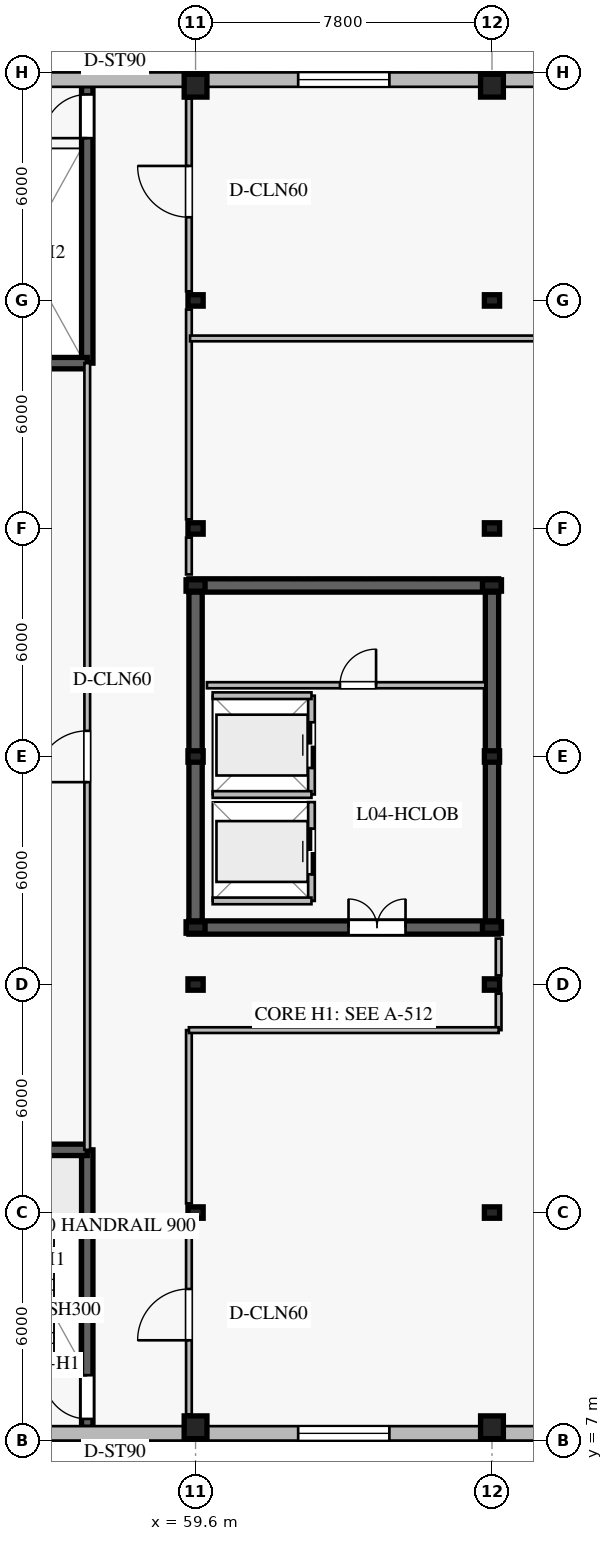
"""IFC4 building model, lengths in metres.
Left out: names, types, materials, properties, quantities, classifications, styles, units other than length and angle.
Written with IfcOpenShell. Run it as: python <this file> out.ifc"""

import sys

from ifc_helpers import new_model, si_unit, direction, frame, frame_2d, origin, origin_2d, place, context, subcontext, project, spatial, rectangle, i_section, extrude, element, fill, save


model = new_model("IFC4")
c1 = context("Model", 3, precision=1e-05, world=origin(), true_north=direction((0.0, 1.0)))
c2 = subcontext(c1, "Body", "Model", "MODEL_VIEW")
j1 = project(units=[si_unit("LENGTHUNIT", "METRE"), si_unit("PLANEANGLEUNIT", "RADIAN")], contexts=[c1])
p1 = place(None, origin())
s1 = spatial("IfcSite", under=j1, at=p1, CompositionType="ELEMENT")
p2 = place(p1, origin())
s2 = spatial("IfcBuilding", under=s1, at=p2, CompositionType="ELEMENT")
p3 = place(p2, frame((0.0, 0.0, 19.0)))
s3 = spatial("IfcBuildingStorey", under=s2, at=p3, CompositionType="ELEMENT", Elevation=19.0)
p4 = place(p3, frame((59.425, 20.5, 0.0), z_axis=(0.0, 0.0, 1.0), x_axis=(1.0, 0.0, 0.0)))
e1 = element("IfcWall", 1, at=p4, inside=s3, PredefinedType="SHEAR", context=c2, shape_type="SweptSolid", body=[
    extrude(rectangle(XDim=8.15, YDim=0.35, at=frame_2d((4.075, 0.0))), origin(), (0.0, 0.0, 1.0), 4.73),
])
p5 = place(p4, frame((4.2, 0.0, 0.0)))
e2 = element("IfcOpeningElement", 2, at=p5, cuts=e1, PredefinedType="OPENING", context=c2, shape_type="SweptSolid", body=[
    extrude(rectangle(XDim=1.5, YDim=2.2, at=frame_2d((0.75, 1.1))), frame((0.0, 0.185, 0.0), z_axis=(0.0, -1.0, 0.0), x_axis=(1.0, 0.0, 0.0)), (0.0, 0.0, 1.0), 0.37),
])
p6 = place(p3, frame((67.575, 29.5, 0.0), z_axis=(0.0, 0.0, 1.0), x_axis=(-1.0, 0.0, 0.0)))
e3 = element("IfcWall", 3, at=p6, inside=s3, PredefinedType="SHEAR", context=c2, shape_type="SweptSolid", body=[
    extrude(rectangle(XDim=8.15, YDim=0.35, at=frame_2d((4.075, 0.0))), origin(), (0.0, 0.0, 1.0), 4.73),
])
for number, where, z_axis, x_axis in (
    (4, (59.6, 29.325, 0.0), (0.0, 0.0, 1.0), (0.0, -1.0, 0.0)),
    (5, (67.4, 20.675, 0.0), (0.0, 0.0, 1.0), (0.0, 1.0, 0.0)),
):
    element("IfcWall", number, at=place(p3, frame(where, z_axis=z_axis, x_axis=x_axis)), inside=s3, PredefinedType="SHEAR", context=c2, shape_type="SweptSolid", body=[
        extrude(rectangle(XDim=8.65, YDim=0.35, at=frame_2d((4.325, 0.0))), origin(), (0.0, 0.0, 1.0), 4.73),
    ])
for number, where, z_axis, x_axis in (
    (6, (59.6, 20.5, 0.0), (0.0, 0.0, 1.0), (1.0, 0.0, 0.0)),
    (7, (67.4, 20.5, 0.0), (0.0, 0.0, 1.0), (1.0, 0.0, 0.0)),
    (8, (67.4, 29.5, 0.0), (0.0, 0.0, 1.0), (1.0, 0.0, 0.0)),
    (9, (59.6, 29.5, 0.0), (0.0, 0.0, 1.0), (1.0, 0.0, 0.0)),
):
    element("IfcColumn", number, at=place(p3, frame(where, z_axis=z_axis, x_axis=x_axis)), inside=s3, PredefinedType="COLUMN", context=c2, shape_type="SweptSolid", body=[
        extrude(i_section(OverallWidth=0.3, OverallDepth=0.5, WebThickness=0.014, FlangeThickness=0.028, at=origin_2d()), origin(), (0.0, 0.0, 1.0), 5.0),
    ])
p7 = place(p3, frame((56.75, 7.35, 0.0), z_axis=(0.0, 0.0, 1.0), x_axis=(0.0, 1.0, 0.0)))
e10 = element("IfcWall", 10, at=p7, inside=s3, PredefinedType="SOLIDWALL", context=c2, shape_type="SweptSolid", body=[
    extrude(rectangle(XDim=7.3, YDim=0.3, at=frame_2d((3.65, 0.0))), origin(), (0.0, 0.0, 1.0), 4.73),
])
p8 = place(p7, frame((0.22, 0.0, 0.0)))
e11 = element("IfcOpeningElement", 11, at=p8, cuts=e10, PredefinedType="OPENING", context=c2, shape_type="SweptSolid", body=[
    extrude(rectangle(XDim=1.15, YDim=2.2, at=frame_2d((0.575, 1.1))), frame((0.0, 0.16, 0.0), z_axis=(0.0, -1.0, 0.0), x_axis=(1.0, 0.0, 0.0)), (0.0, 0.0, 1.0), 0.32),
])
p9 = place(p3, frame((53.4, 14.65, 0.0), z_axis=(0.0, 0.0, 1.0), x_axis=(1.0, 0.0, 0.0)))
e12 = element("IfcWall", 12, at=p9, inside=s3, PredefinedType="SOLIDWALL", context=c2, shape_type="SweptSolid", body=[
    extrude(rectangle(XDim=3.35, YDim=0.3, at=frame_2d((1.675, 0.0))), origin(), (0.0, 0.0, 1.0), 4.73),
])
p10 = place(p3, frame((56.75, 35.35, 0.0), z_axis=(0.0, 0.0, 1.0), x_axis=(0.0, 1.0, 0.0)))
e13 = element("IfcWall", 13, at=p10, inside=s3, PredefinedType="SOLIDWALL", context=c2, shape_type="SweptSolid", body=[
    extrude(rectangle(XDim=7.3, YDim=0.3, at=frame_2d((3.65, 0.0))), origin(), (0.0, 0.0, 1.0), 4.73),
])
p11 = place(p10, frame((5.92, 0.0, 0.0)))
e14 = element("IfcOpeningElement", 14, at=p11, cuts=e13, PredefinedType="OPENING", context=c2, shape_type="SweptSolid", body=[
    extrude(rectangle(XDim=1.15, YDim=2.2, at=frame_2d((0.575, 1.1))), frame((0.0, 0.16, 0.0), z_axis=(0.0, -1.0, 0.0), x_axis=(1.0, 0.0, 0.0)), (0.0, 0.0, 1.0), 0.32),
])
p12 = place(p3, frame((53.4, 35.35, 0.0), z_axis=(0.0, 0.0, 1.0), x_axis=(1.0, 0.0, 0.0)))
e15 = element("IfcWall", 15, at=p12, inside=s3, PredefinedType="SOLIDWALL", context=c2, shape_type="SweptSolid", body=[
    extrude(rectangle(XDim=3.35, YDim=0.3, at=frame_2d((1.675, 0.0))), origin(), (0.0, 0.0, 1.0), 4.73),
])
p13 = place(p3, frame((59.6, 7.35, 0.0), z_axis=(0.0, 0.0, 1.0), x_axis=(1.0, 0.0, 0.0)))
e16 = element("IfcColumn", 16, at=p13, inside=s3, PredefinedType="COLUMN", context=c2, shape_type="SweptSolid", body=[
    extrude(rectangle(XDim=0.6, YDim=0.6, at=origin_2d()), origin(), (0.0, 0.0, 1.0), 4.73),
])
for number, where, z_axis, x_axis in (
    (17, (59.6, 13.0, 0.0), (0.0, 0.0, 1.0), (1.0, 0.0, 0.0)),
    (18, (59.6, 19.0, 0.0), (0.0, 0.0, 1.0), (1.0, 0.0, 0.0)),
):
    element("IfcColumn", number, at=place(p3, frame(where, z_axis=z_axis, x_axis=x_axis)), inside=s3, PredefinedType="COLUMN", context=c2, shape_type="SweptSolid", body=[
        extrude(i_section(OverallWidth=0.3, OverallDepth=0.4, WebThickness=0.013, FlangeThickness=0.024, at=origin_2d()), origin(), (0.0, 0.0, 1.0), 4.73),
    ])
for number, where, z_axis, x_axis in (
    (19, (59.6, 25.0, 0.0), (0.0, 0.0, 1.0), (1.0, 0.0, 0.0)),
    (20, (59.6, 31.0, 0.0), (0.0, 0.0, 1.0), (1.0, 0.0, 0.0)),
    (21, (59.6, 37.0, 0.0), (0.0, 0.0, 1.0), (1.0, 0.0, 0.0)),
):
    element("IfcColumn", number, at=place(p3, frame(where, z_axis=z_axis, x_axis=x_axis)), inside=s3, PredefinedType="COLUMN", context=c2, shape_type="SweptSolid", body=[
        extrude(i_section(OverallWidth=0.3, OverallDepth=0.4, WebThickness=0.013, FlangeThickness=0.024, at=origin_2d()), origin(), (0.0, 0.0, 1.0), 4.77),
    ])
p14 = place(p3, frame((59.6, 42.65, 0.0), z_axis=(0.0, 0.0, 1.0), x_axis=(1.0, 0.0, 0.0)))
e22 = element("IfcColumn", 22, at=p14, inside=s3, PredefinedType="COLUMN", context=c2, shape_type="SweptSolid", body=[
    extrude(rectangle(XDim=0.6, YDim=0.6, at=origin_2d()), origin(), (0.0, 0.0, 1.0), 4.77),
])
p15 = place(p3, frame((67.4, 7.35, 0.0), z_axis=(0.0, 0.0, 1.0), x_axis=(1.0, 0.0, 0.0)))
e23 = element("IfcColumn", 23, at=p15, inside=s3, PredefinedType="COLUMN", context=c2, shape_type="SweptSolid", body=[
    extrude(rectangle(XDim=0.6, YDim=0.6, at=origin_2d()), origin(), (0.0, 0.0, 1.0), 4.73),
])
for number, where, z_axis, x_axis in (
    (24, (67.4, 13.0, 0.0), (0.0, 0.0, 1.0), (1.0, 0.0, 0.0)),
    (25, (67.4, 19.0, 0.0), (0.0, 0.0, 1.0), (1.0, 0.0, 0.0)),
):
    element("IfcColumn", number, at=place(p3, frame(where, z_axis=z_axis, x_axis=x_axis)), inside=s3, PredefinedType="COLUMN", context=c2, shape_type="SweptSolid", body=[
        extrude(i_section(OverallWidth=0.3, OverallDepth=0.4, WebThickness=0.013, FlangeThickness=0.024, at=origin_2d()), origin(), (0.0, 0.0, 1.0), 4.73),
    ])
for number, where, z_axis, x_axis in (
    (26, (67.4, 25.0, 0.0), (0.0, 0.0, 1.0), (1.0, 0.0, 0.0)),
    (27, (67.4, 31.0, 0.0), (0.0, 0.0, 1.0), (1.0, 0.0, 0.0)),
    (28, (67.4, 37.0, 0.0), (0.0, 0.0, 1.0), (1.0, 0.0, 0.0)),
):
    element("IfcColumn", number, at=place(p3, frame(where, z_axis=z_axis, x_axis=x_axis)), inside=s3, PredefinedType="COLUMN", context=c2, shape_type="SweptSolid", body=[
        extrude(i_section(OverallWidth=0.3, OverallDepth=0.4, WebThickness=0.013, FlangeThickness=0.024, at=origin_2d()), origin(), (0.0, 0.0, 1.0), 4.77),
    ])
p16 = place(p3, frame((67.4, 42.65, 0.0), z_axis=(0.0, 0.0, 1.0), x_axis=(1.0, 0.0, 0.0)))
e29 = element("IfcColumn", 29, at=p16, inside=s3, PredefinedType="COLUMN", context=c2, shape_type="SweptSolid", body=[
    extrude(rectangle(XDim=0.6, YDim=0.6, at=origin_2d()), origin(), (0.0, 0.0, 1.0), 4.77),
])
p17 = place(p3, frame((75.0, 7.19, 0.0), z_axis=(0.0, 0.0, 1.0), x_axis=(-1.0, 0.0, 0.0)))
e30 = element("IfcWall", 30, at=p17, inside=s3, PredefinedType="STANDARD", context=c2, shape_type="SweptSolid", body=[
    extrude(rectangle(XDim=23.0, YDim=0.38, at=frame_2d((11.5, 0.0))), origin(), (0.0, 0.0, 1.0), 4.73),
])
p18 = place(p17, frame((10.3, 0.0, 0.95)))
e31 = element("IfcOpeningElement", 31, at=p18, cuts=e30, PredefinedType="OPENING", context=c2, shape_type="SweptSolid", body=[
    extrude(rectangle(XDim=2.4, YDim=1.8, at=frame_2d((1.2, 0.9))), frame((0.0, 0.2, 0.0), z_axis=(0.0, -1.0, 0.0), x_axis=(1.0, 0.0, 0.0)), (0.0, 0.0, 1.0), 0.4),
])
p19 = place(p3, frame((52.0, 42.81, 0.0), z_axis=(0.0, 0.0, 1.0), x_axis=(1.0, 0.0, 0.0)))
e32 = element("IfcWall", 32, at=p19, inside=s3, PredefinedType="STANDARD", context=c2, shape_type="SweptSolid", body=[
    extrude(rectangle(XDim=23.0, YDim=0.38, at=frame_2d((11.5, 0.0))), origin(), (0.0, 0.0, 1.0), 4.73),
])
p20 = place(p19, frame((10.3, 0.0, 0.95)))
e33 = element("IfcOpeningElement", 33, at=p20, cuts=e32, PredefinedType="OPENING", context=c2, shape_type="SweptSolid", body=[
    extrude(rectangle(XDim=2.4, YDim=1.8, at=frame_2d((1.2, 0.9))), frame((0.0, 0.2, 0.0), z_axis=(0.0, -1.0, 0.0), x_axis=(1.0, 0.0, 0.0)), (0.0, 0.0, 1.0), 0.4),
])
p21 = place(p3, frame((62.65, 21.2, 0.0), z_axis=(0.0, 0.0, 1.0), x_axis=(0.0, 1.0, 0.0)))
e34 = element("IfcWall", 34, at=p21, inside=s3, PredefinedType="PARTITIONING", context=c2, shape_type="SweptSolid", body=[
    extrude(rectangle(XDim=2.6, YDim=0.175, at=frame_2d((1.3, 0.0))), origin(), (0.0, 0.0, 1.0), 4.76),
])
p22 = place(p21, frame((0.7, 0.0, 0.0)))
e35 = element("IfcOpeningElement", 35, at=p22, cuts=e34, PredefinedType="OPENING", context=c2, shape_type="SweptSolid", body=[
    extrude(rectangle(XDim=1.2, YDim=2.2, at=frame_2d((0.6, 1.1))), frame((0.0, 0.098, 0.0), z_axis=(0.0, -1.0, 0.0), x_axis=(1.0, 0.0, 0.0)), (0.0, 0.0, 1.0), 0.195),
])
p23 = place(p3, frame((60.05, 21.2, 0.0), z_axis=(0.0, 0.0, 1.0), x_axis=(1.0, 0.0, 0.0)))
e36 = element("IfcWall", 36, at=p23, inside=s3, PredefinedType="PARTITIONING", context=c2, shape_type="SweptSolid", body=[
    extrude(rectangle(XDim=2.6, YDim=0.175, at=frame_2d((1.3, 0.0))), origin(), (0.0, 0.0, 1.0), 4.76),
])
p24 = place(p3, frame((62.65, 24.0, 0.0), z_axis=(0.0, 0.0, 1.0), x_axis=(0.0, 1.0, 0.0)))
e37 = element("IfcWall", 37, at=p24, inside=s3, PredefinedType="PARTITIONING", context=c2, shape_type="SweptSolid", body=[
    extrude(rectangle(XDim=2.6, YDim=0.175, at=frame_2d((1.3, 0.0))), origin(), (0.0, 0.0, 1.0), 4.41),
])
p25 = place(p24, frame((0.7, 0.0, 0.0)))
e38 = element("IfcOpeningElement", 38, at=p25, cuts=e37, PredefinedType="OPENING", context=c2, shape_type="SweptSolid", body=[
    extrude(rectangle(XDim=1.2, YDim=2.2, at=frame_2d((0.6, 1.1))), frame((0.0, 0.098, 0.0), z_axis=(0.0, -1.0, 0.0), x_axis=(1.0, 0.0, 0.0)), (0.0, 0.0, 1.0), 0.195),
])
for number, where, z_axis, x_axis in (
    (39, (60.05, 24.0, 0.0), (0.0, 0.0, 1.0), (1.0, 0.0, 0.0)),
    (40, (60.05, 26.6, 0.0), (0.0, 0.0, 1.0), (1.0, 0.0, 0.0)),
):
    element("IfcWall", number, at=place(p3, frame(where, z_axis=z_axis, x_axis=x_axis)), inside=s3, PredefinedType="PARTITIONING", context=c2, shape_type="SweptSolid", body=[
        extrude(rectangle(XDim=2.6, YDim=0.175, at=frame_2d((1.3, 0.0))), origin(), (0.0, 0.0, 1.0), 4.76),
    ])
p26 = place(p3, frame((59.9, 26.875, 0.0), z_axis=(0.0, 0.0, 1.0), x_axis=(1.0, 0.0, 0.0)))
e41 = element("IfcWall", 41, at=p26, inside=s3, PredefinedType="PLUMBINGWALL", context=c2, shape_type="SweptSolid", body=[
    extrude(rectangle(XDim=7.325, YDim=0.16, at=frame_2d((3.663, 0.0))), origin(), (0.0, 0.0, 1.0), 4.41),
])
p27 = place(p26, frame((3.5, 0.0, 0.0)))
e42 = element("IfcOpeningElement", 42, at=p27, cuts=e41, PredefinedType="OPENING", context=c2, shape_type="SweptSolid", body=[
    extrude(rectangle(XDim=0.95, YDim=2.1, at=frame_2d((0.475, 1.05))), frame((0.0, 0.09, 0.0), z_axis=(0.0, -1.0, 0.0), x_axis=(1.0, 0.0, 0.0)), (0.0, 0.0, 1.0), 0.18),
])
p28 = place(p3, frame((56.75, 14.65, 0.0), z_axis=(0.0, 0.0, 1.0), x_axis=(0.0, 1.0, 0.0)))
e43 = element("IfcWall", 43, at=p28, inside=s3, PredefinedType="PARTITIONING", context=c2, shape_type="SweptSolid", body=[
    extrude(rectangle(XDim=20.7, YDim=0.15, at=frame_2d((10.35, 0.0))), origin(), (0.0, 0.0, 1.0), 4.76),
])
p29 = place(p28, frame((9.675, 0.0, 0.0)))
e44 = element("IfcOpeningElement", 44, at=p29, cuts=e43, PredefinedType="OPENING", context=c2, shape_type="SweptSolid", body=[
    extrude(rectangle(XDim=1.35, YDim=2.2, at=frame_2d((0.675, 1.1))), frame((0.0, 0.085, 0.0), z_axis=(0.0, -1.0, 0.0), x_axis=(1.0, 0.0, 0.0)), (0.0, 0.0, 1.0), 0.17),
])
p30 = place(p3, frame((59.425, 7.69, 0.0), z_axis=(0.0, 0.0, 1.0), x_axis=(0.0, 1.0, 0.0)))
e45 = element("IfcWall", 45, at=p30, inside=s3, PredefinedType="PARTITIONING", context=c2, shape_type="SweptSolid", body=[
    extrude(rectangle(XDim=5.07, YDim=0.15, at=frame_2d((2.535, 0.0))), origin(), (0.0, 0.0, 1.0), 4.37),
])
p31 = place(p30, frame((1.949, 0.0, 0.0)))
e46 = element("IfcOpeningElement", 46, at=p31, cuts=e45, PredefinedType="OPENING", context=c2, shape_type="SweptSolid", body=[
    extrude(rectangle(XDim=1.35, YDim=2.2, at=frame_2d((0.675, 1.1))), frame((0.0, 0.085, 0.0), z_axis=(0.0, -1.0, 0.0), x_axis=(1.0, 0.0, 0.0)), (0.0, 0.0, 1.0), 0.17),
])
p32 = place(p3, frame((59.425, 13.24, 0.0), z_axis=(0.0, 0.0, 1.0), x_axis=(0.0, 1.0, 0.0)))
e47 = element("IfcWall", 47, at=p32, inside=s3, PredefinedType="PARTITIONING", context=c2, shape_type="SweptSolid", body=[
    extrude(rectangle(XDim=4.56, YDim=0.15, at=frame_2d((2.28, 0.0))), origin(), (0.0, 0.0, 1.0), 4.37),
])
p33 = place(p3, frame((59.425, 29.79, 0.0), z_axis=(0.0, 0.0, 1.0), x_axis=(0.0, 1.0, 0.0)))
e48 = element("IfcWall", 48, at=p33, inside=s3, PredefinedType="PARTITIONING", context=c2, shape_type="SweptSolid", body=[
    extrude(rectangle(XDim=0.97, YDim=0.15, at=frame_2d((0.485, 0.0))), origin(), (0.0, 0.0, 1.0), 4.41),
])
p34 = place(p3, frame((59.425, 31.24, 0.0), z_axis=(0.0, 0.0, 1.0), x_axis=(0.0, 1.0, 0.0)))
e49 = element("IfcWall", 49, at=p34, inside=s3, PredefinedType="PARTITIONING", context=c2, shape_type="SweptSolid", body=[
    extrude(rectangle(XDim=5.52, YDim=0.15, at=frame_2d((2.76, 0.0))), origin(), (0.0, 0.0, 1.0), 4.41),
])
p35 = place(p3, frame((59.425, 37.24, 0.0), z_axis=(0.0, 0.0, 1.0), x_axis=(0.0, 1.0, 0.0)))
e50 = element("IfcWall", 50, at=p35, inside=s3, PredefinedType="PARTITIONING", context=c2, shape_type="SweptSolid", body=[
    extrude(rectangle(XDim=5.07, YDim=0.15, at=frame_2d((2.535, 0.0))), origin(), (0.0, 0.0, 1.0), 4.41),
])
p36 = place(p35, frame((1.949, 0.0, 0.0)))
e51 = element("IfcOpeningElement", 51, at=p36, cuts=e50, PredefinedType="OPENING", context=c2, shape_type="SweptSolid", body=[
    extrude(rectangle(XDim=1.35, YDim=2.2, at=frame_2d((0.675, 1.1))), frame((0.0, 0.085, 0.0), z_axis=(0.0, -1.0, 0.0), x_axis=(1.0, 0.0, 0.0)), (0.0, 0.0, 1.0), 0.17),
])
p37 = place(p3, frame((67.575, 17.8, 0.0), z_axis=(0.0, 0.0, 1.0), x_axis=(0.0, 1.0, 0.0)))
e52 = element("IfcWall", 52, at=p37, inside=s3, PredefinedType="PARTITIONING", context=c2, shape_type="SweptSolid", body=[
    extrude(rectangle(XDim=0.96, YDim=0.15, at=frame_2d((0.48, 0.0))), origin(), (0.0, 0.0, 1.0), 4.37),
])
p38 = place(p3, frame((67.575, 19.24, 0.0), z_axis=(0.0, 0.0, 1.0), x_axis=(0.0, 1.0, 0.0)))
e53 = element("IfcWall", 53, at=p38, inside=s3, PredefinedType="PARTITIONING", context=c2, shape_type="SweptSolid", body=[
    extrude(rectangle(XDim=0.97, YDim=0.15, at=frame_2d((0.485, 0.0))), origin(), (0.0, 0.0, 1.0), 4.37),
])
p39 = place(p3, frame((59.425, 17.8, 0.0), z_axis=(0.0, 0.0, 1.0), x_axis=(1.0, 0.0, 0.0)))
e54 = element("IfcWall", 54, at=p39, inside=s3, PredefinedType="PARTITIONING", context=c2, shape_type="SweptSolid", body=[
    extrude(rectangle(XDim=8.15, YDim=0.15, at=frame_2d((4.075, 0.0))), origin(), (0.0, 0.0, 1.0), 4.37),
])
p40 = place(p3, frame((59.455, 36.0, 0.0), z_axis=(0.0, 0.0, 1.0), x_axis=(1.0, 0.0, 0.0)))
e55 = element("IfcWall", 55, at=p40, inside=s3, PredefinedType="PARTITIONING", context=c2, shape_type="SweptSolid", body=[
    extrude(rectangle(XDim=15.165, YDim=0.15, at=frame_2d((7.583, 0.0))), origin(), (0.0, 0.0, 1.0), 4.41),
])
p41 = place(p18, origin())
e56 = element("IfcWindow", 56, at=p41, inside=s3, PartitioningType="TRIPLE_PANEL_VERTICAL", PredefinedType="WINDOW", context=c2, shape_type="SweptSolid", body=[
    extrude(rectangle(XDim=2.4, YDim=1.8, at=frame_2d((1.2, 0.9))), frame((0.0, 0.03, 0.0), z_axis=(0.0, -1.0, 0.0), x_axis=(1.0, 0.0, 0.0)), (0.0, 0.0, 1.0), 0.06),
])
fill(e31, e56)
p42 = place(p20, origin())
e57 = element("IfcWindow", 57, at=p42, inside=s3, PartitioningType="TRIPLE_PANEL_VERTICAL", PredefinedType="WINDOW", context=c2, shape_type="SweptSolid", body=[
    extrude(rectangle(XDim=2.4, YDim=1.8, at=frame_2d((1.2, 0.9))), frame((0.0, 0.03, 0.0), z_axis=(0.0, -1.0, 0.0), x_axis=(1.0, 0.0, 0.0)), (0.0, 0.0, 1.0), 0.06),
])
fill(e33, e57)
p43 = place(p22, origin())
e58 = element("IfcDoor", 58, at=p43, inside=s3, OperationType="DOUBLE_DOOR_SLIDING", PredefinedType="DOOR", context=c2, shape_type="SweptSolid", body=[
    extrude(rectangle(XDim=1.2, YDim=2.2, at=frame_2d((0.6, 1.1))), frame((0.0, 0.025, 0.0), z_axis=(0.0, -1.0, 0.0), x_axis=(1.0, 0.0, 0.0)), (0.0, 0.0, 1.0), 0.05),
])
fill(e35, e58)
p44 = place(p25, origin())
e59 = element("IfcDoor", 59, at=p44, inside=s3, OperationType="DOUBLE_DOOR_SLIDING", PredefinedType="DOOR", context=c2, shape_type="SweptSolid", body=[
    extrude(rectangle(XDim=1.2, YDim=2.2, at=frame_2d((0.6, 1.1))), frame((0.0, 0.025, 0.0), z_axis=(0.0, -1.0, 0.0), x_axis=(1.0, 0.0, 0.0)), (0.0, 0.0, 1.0), 0.05),
])
fill(e38, e59)
p45 = place(p8, origin())
e60 = element("IfcDoor", 60, at=p45, inside=s3, OperationType="SINGLE_SWING_RIGHT", PredefinedType="DOOR", context=c2, shape_type="SweptSolid", body=[
    extrude(rectangle(XDim=1.15, YDim=2.2, at=frame_2d((0.575, 1.1))), frame((0.0, 0.025, 0.0), z_axis=(0.0, -1.0, 0.0), x_axis=(1.0, 0.0, 0.0)), (0.0, 0.0, 1.0), 0.05),
])
fill(e11, e60)
p46 = place(p11, origin())
e61 = element("IfcDoor", 61, at=p46, inside=s3, OperationType="SINGLE_SWING_LEFT", PredefinedType="DOOR", context=c2, shape_type="SweptSolid", body=[
    extrude(rectangle(XDim=1.15, YDim=2.2, at=frame_2d((0.575, 1.1))), frame((0.0, 0.025, 0.0), z_axis=(0.0, -1.0, 0.0), x_axis=(1.0, 0.0, 0.0)), (0.0, 0.0, 1.0), 0.05),
])
fill(e14, e61)
p47 = place(p5, origin())
e62 = element("IfcDoor", 62, at=p47, inside=s3, OperationType="DOUBLE_DOOR_SINGLE_SWING", PredefinedType="DOOR", context=c2, shape_type="SweptSolid", body=[
    extrude(rectangle(XDim=1.5, YDim=2.2, at=frame_2d((0.75, 1.1))), frame((0.0, 0.025, 0.0), z_axis=(0.0, -1.0, 0.0), x_axis=(1.0, 0.0, 0.0)), (0.0, 0.0, 1.0), 0.05),
])
fill(e2, e62)
p48 = place(p27, origin())
e63 = element("IfcDoor", 63, at=p48, inside=s3, OperationType="SINGLE_SWING_RIGHT", PredefinedType="DOOR", context=c2, shape_type="SweptSolid", body=[
    extrude(rectangle(XDim=0.95, YDim=2.1, at=frame_2d((0.475, 1.05))), frame((0.0, 0.025, 0.0), z_axis=(0.0, -1.0, 0.0), x_axis=(1.0, 0.0, 0.0)), (0.0, 0.0, 1.0), 0.05),
])
fill(e42, e63)
p49 = place(p29, origin())
e64 = element("IfcDoor", 64, at=p49, inside=s3, OperationType="SINGLE_SWING_LEFT", PredefinedType="DOOR", context=c2, shape_type="SweptSolid", body=[
    extrude(rectangle(XDim=1.35, YDim=2.2, at=frame_2d((0.675, 1.1))), frame((0.0, 0.025, 0.0), z_axis=(0.0, -1.0, 0.0), x_axis=(1.0, 0.0, 0.0)), (0.0, 0.0, 1.0), 0.05),
])
fill(e44, e64)
p50 = place(p36, origin())
e65 = element("IfcDoor", 65, at=p50, inside=s3, OperationType="SINGLE_SWING_RIGHT", PredefinedType="DOOR", context=c2, shape_type="SweptSolid", body=[
    extrude(rectangle(XDim=1.35, YDim=2.2, at=frame_2d((0.675, 1.1))), frame((0.0, 0.025, 0.0), z_axis=(0.0, -1.0, 0.0), x_axis=(1.0, 0.0, 0.0)), (0.0, 0.0, 1.0), 0.05),
])
fill(e51, e65)
p51 = place(p31, origin())
e66 = element("IfcDoor", 66, at=p51, inside=s3, OperationType="SINGLE_SWING_LEFT", PredefinedType="DOOR", context=c2, shape_type="SweptSolid", body=[
    extrude(rectangle(XDim=1.35, YDim=2.2, at=frame_2d((0.675, 1.1))), frame((0.0, 0.025, 0.0), z_axis=(0.0, -1.0, 0.0), x_axis=(1.0, 0.0, 0.0)), (0.0, 0.0, 1.0), 0.05),
])
fill(e46, e66)
save(model, sys.argv[1])
